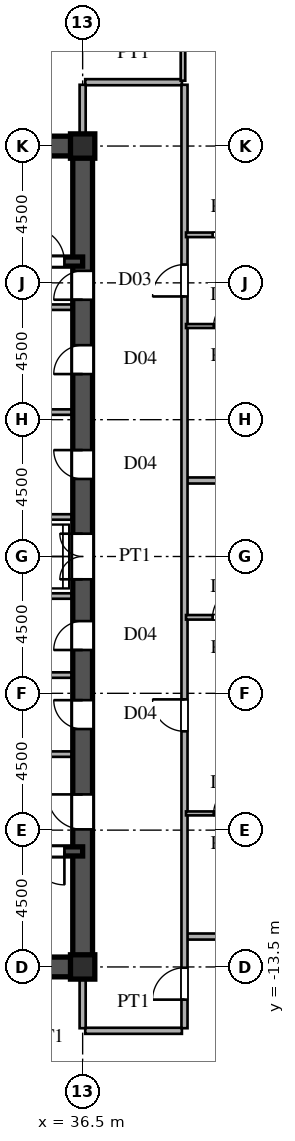
"""IFC4 building model, lengths in metres.
Left out: names, types, materials, properties, quantities, classifications, styles, units other than length and angle.
Written with IfcOpenShell. Run it as: python <this file> out.ifc"""

import sys

from ifc_helpers import new_model, si_unit, direction, frame, frame_2d, origin, origin_2d, place, context, subcontext, project, spatial, rectangle, i_section, extrude, source, transform, mapped, element, fill, save


model = new_model("IFC4")
c1 = context("Model", 3, precision=1e-05, world=origin(), true_north=direction((0.0, 1.0)))
c2 = subcontext(c1, "Body", "Model", "MODEL_VIEW")
j1 = project(units=[si_unit("LENGTHUNIT", "METRE"), si_unit("PLANEANGLEUNIT", "RADIAN")], contexts=[c1])
p1 = place(None, origin())
s1 = spatial("IfcSite", under=j1, at=p1, CompositionType="ELEMENT")
p2 = place(p1, origin())
s2 = spatial("IfcBuilding", under=s1, at=p2, CompositionType="ELEMENT")
p3 = place(p2, frame((0.0, 0.0, 96.0)))
s3 = spatial("IfcBuildingStorey", under=s2, at=p3, CompositionType="ELEMENT", Elevation=96.0)
m1 = source(origin(), c2, "Body", "SweptSolid", [
    extrude(i_section(OverallWidth=0.8, OverallDepth=0.8, WebThickness=0.032, FlangeThickness=0.05, at=origin_2d()), origin(), (0.0, 0.0, 1.0), 3.6),
])
for number, where, z_axis, x_axis in (
    (1, (36.5, -13.5, 0.0), (0.0, 0.0, 1.0), (1.0, 0.0, 0.0)),
    (2, (36.5, 13.5, 0.0), (0.0, 0.0, 1.0), (1.0, 0.0, 0.0)),
):
    element("IfcColumn", number, at=place(p3, frame(where, z_axis=z_axis, x_axis=x_axis)), inside=s3, PredefinedType="COLUMN", context=c2, shape_type="MappedRepresentation", body=[
        mapped(m1, transform((0.0, 0.0, 0.0), scale=1.0)),
    ])
for number, where, z_axis, x_axis in (
    (3, (27.5, -13.5, 0.0), (0.0, 0.0, 1.0), (1.0, 0.0, 0.0)),
    (4, (27.5, 13.5, 0.0), (0.0, 0.0, 1.0), (1.0, 0.0, 0.0)),
):
    element("IfcWall", number, at=place(p3, frame(where, z_axis=z_axis, x_axis=x_axis)), inside=s3, PredefinedType="SHEAR", context=c2, shape_type="SweptSolid", body=[
        extrude(rectangle(XDim=9.0, YDim=0.65, at=frame_2d((4.5, 0.0))), origin(), (0.0, 0.0, 1.0), 3.38),
    ])
p4 = place(p3, frame((36.5, -13.65, 0.0), z_axis=(0.0, 0.0, 1.0), x_axis=(0.0, 1.0, 0.0)))
e5 = element("IfcWall", 5, at=p4, inside=s3, PredefinedType="SHEAR", context=c2, shape_type="SweptSolid", body=[
    extrude(rectangle(XDim=7.15, YDim=0.65, at=frame_2d((3.575, 0.0))), origin(), (0.0, 0.0, 1.0), 3.38),
])
p5 = place(p4, frame((4.675, 0.0, 0.0)))
e6 = element("IfcOpeningElement", 6, at=p5, cuts=e5, PredefinedType="OPENING", context=c2, shape_type="SweptSolid", body=[
    extrude(rectangle(XDim=1.15, YDim=2.2, at=frame_2d((0.575, 1.1))), frame((0.0, 0.335, 0.0), z_axis=(0.0, -1.0, 0.0), x_axis=(1.0, 0.0, 0.0)), (0.0, 0.0, 1.0), 0.67),
])
p6 = place(p3, frame((36.5, -1.3, 0.0), z_axis=(0.0, 0.0, 1.0), x_axis=(0.0, 1.0, 0.0)))
e7 = element("IfcWall", 7, at=p6, inside=s3, PredefinedType="SHEAR", context=c2, shape_type="SweptSolid", body=[
    extrude(rectangle(XDim=2.6, YDim=0.65, at=frame_2d((1.3, 0.0))), origin(), (0.0, 0.0, 1.0), 3.38),
])
p7 = place(p6, frame((0.55, 0.0, 0.0)))
e8 = element("IfcOpeningElement", 8, at=p7, cuts=e7, PredefinedType="OPENING", context=c2, shape_type="SweptSolid", body=[
    extrude(rectangle(XDim=1.5, YDim=2.3, at=frame_2d((0.75, 1.15))), frame((0.0, 0.335, 0.0), z_axis=(0.0, -1.0, 0.0), x_axis=(1.0, 0.0, 0.0)), (0.0, 0.0, 1.0), 0.67),
])
p8 = place(p3, frame((36.5, 8.2, 0.0), z_axis=(0.0, 0.0, 1.0), x_axis=(0.0, 1.0, 0.0)))
e9 = element("IfcWall", 9, at=p8, inside=s3, PredefinedType="SHEAR", context=c2, shape_type="SweptSolid", body=[
    extrude(rectangle(XDim=5.45, YDim=0.65, at=frame_2d((2.725, 0.0))), origin(), (0.0, 0.0, 1.0), 3.38),
])
p9 = place(p8, frame((0.245, 0.0, 0.0)))
e10 = element("IfcOpeningElement", 10, at=p9, cuts=e9, PredefinedType="OPENING", context=c2, shape_type="SweptSolid", body=[
    extrude(rectangle(XDim=0.95, YDim=2.15, at=frame_2d((0.475, 1.075))), frame((0.0, 0.335, 0.0), z_axis=(0.0, -1.0, 0.0), x_axis=(1.0, 0.0, 0.0)), (0.0, 0.0, 1.0), 0.67),
])
p10 = place(p3, frame((36.5, -6.5, 0.0), z_axis=(0.0, 0.0, 1.0), x_axis=(0.0, 1.0, 0.0)))
e11 = element("IfcWall", 11, at=p10, inside=s3, PredefinedType="SHEAR", context=c2, shape_type="SweptSolid", body=[
    extrude(rectangle(XDim=2.6, YDim=0.65, at=frame_2d((1.3, 0.0))), origin(), (0.0, 0.0, 1.0), 3.38),
])
p11 = place(p10, frame((0.825, 0.0, 0.0)))
e12 = element("IfcOpeningElement", 12, at=p11, cuts=e11, PredefinedType="OPENING", context=c2, shape_type="SweptSolid", body=[
    extrude(rectangle(XDim=0.95, YDim=2.15, at=frame_2d((0.475, 1.075))), frame((0.0, 0.335, 0.0), z_axis=(0.0, -1.0, 0.0), x_axis=(1.0, 0.0, 0.0)), (0.0, 0.0, 1.0), 0.67),
])
p12 = place(p3, frame((36.5, -3.9, 0.0), z_axis=(0.0, 0.0, 1.0), x_axis=(0.0, 1.0, 0.0)))
e13 = element("IfcWall", 13, at=p12, inside=s3, PredefinedType="SHEAR", context=c2, shape_type="SweptSolid", body=[
    extrude(rectangle(XDim=2.6, YDim=0.65, at=frame_2d((1.3, 0.0))), origin(), (0.0, 0.0, 1.0), 3.38),
])
p13 = place(p12, frame((0.825, 0.0, 0.0)))
e14 = element("IfcOpeningElement", 14, at=p13, cuts=e13, PredefinedType="OPENING", context=c2, shape_type="SweptSolid", body=[
    extrude(rectangle(XDim=0.95, YDim=2.15, at=frame_2d((0.475, 1.075))), frame((0.0, 0.335, 0.0), z_axis=(0.0, -1.0, 0.0), x_axis=(1.0, 0.0, 0.0)), (0.0, 0.0, 1.0), 0.67),
])
p14 = place(p3, frame((36.5, 1.3, 0.0), z_axis=(0.0, 0.0, 1.0), x_axis=(0.0, 1.0, 0.0)))
e15 = element("IfcWall", 15, at=p14, inside=s3, PredefinedType="SHEAR", context=c2, shape_type="SweptSolid", body=[
    extrude(rectangle(XDim=3.45, YDim=0.65, at=frame_2d((1.725, 0.0))), origin(), (0.0, 0.0, 1.0), 3.38),
])
p15 = place(p14, frame((1.25, 0.0, 0.0)))
e16 = element("IfcOpeningElement", 16, at=p15, cuts=e15, PredefinedType="OPENING", context=c2, shape_type="SweptSolid", body=[
    extrude(rectangle(XDim=0.95, YDim=2.15, at=frame_2d((0.475, 1.075))), frame((0.0, 0.335, 0.0), z_axis=(0.0, -1.0, 0.0), x_axis=(1.0, 0.0, 0.0)), (0.0, 0.0, 1.0), 0.67),
])
p16 = place(p3, frame((36.5, 4.75, 0.0), z_axis=(0.0, 0.0, 1.0), x_axis=(0.0, 1.0, 0.0)))
e17 = element("IfcWall", 17, at=p16, inside=s3, PredefinedType="SHEAR", context=c2, shape_type="SweptSolid", body=[
    extrude(rectangle(XDim=3.45, YDim=0.65, at=frame_2d((1.725, 0.0))), origin(), (0.0, 0.0, 1.0), 3.38),
])
p17 = place(p16, frame((1.25, 0.0, 0.0)))
e18 = element("IfcOpeningElement", 18, at=p17, cuts=e17, PredefinedType="OPENING", context=c2, shape_type="SweptSolid", body=[
    extrude(rectangle(XDim=0.95, YDim=2.15, at=frame_2d((0.475, 1.075))), frame((0.0, 0.335, 0.0), z_axis=(0.0, -1.0, 0.0), x_axis=(1.0, 0.0, 0.0)), (0.0, 0.0, 1.0), 0.67),
])
p18 = place(p3, frame((27.5, -9.7, 0.0), z_axis=(0.0, 0.0, 1.0), x_axis=(1.0, 0.0, 0.0)))
e19 = element("IfcWall", 19, at=p18, inside=s3, PredefinedType="SHEAR", context=c2, shape_type="SweptSolid", body=[
    extrude(rectangle(XDim=9.0, YDim=0.3, at=frame_2d((4.5, 0.0))), origin(), (0.0, 0.0, 1.0), 3.38),
])
p19 = place(p18, frame((7.3, 0.0, 0.0)))
e20 = element("IfcOpeningElement", 20, at=p19, cuts=e19, PredefinedType="OPENING", context=c2, shape_type="SweptSolid", body=[
    extrude(rectangle(XDim=1.1, YDim=2.2, at=frame_2d((0.55, 1.1))), frame((0.0, 0.16, 0.0), z_axis=(0.0, -1.0, 0.0), x_axis=(1.0, 0.0, 0.0)), (0.0, 0.0, 1.0), 0.32),
])
p20 = place(p3, frame((27.5, 9.7, 0.0), z_axis=(0.0, 0.0, 1.0), x_axis=(1.0, 0.0, 0.0)))
e21 = element("IfcWall", 21, at=p20, inside=s3, PredefinedType="SHEAR", context=c2, shape_type="SweptSolid", body=[
    extrude(rectangle(XDim=9.0, YDim=0.3, at=frame_2d((4.5, 0.0))), origin(), (0.0, 0.0, 1.0), 3.38),
])
p21 = place(p20, frame((7.3, 0.0, 0.0)))
e22 = element("IfcOpeningElement", 22, at=p21, cuts=e21, PredefinedType="OPENING", context=c2, shape_type="SweptSolid", body=[
    extrude(rectangle(XDim=1.1, YDim=2.2, at=frame_2d((0.55, 1.1))), frame((0.0, 0.16, 0.0), z_axis=(0.0, -1.0, 0.0), x_axis=(1.0, 0.0, 0.0)), (0.0, 0.0, 1.0), 0.32),
])
for number, where, z_axis, x_axis in (
    (23, (30.45, -6.5, 0.0), (0.0, 0.0, 1.0), (1.0, 0.0, 0.0)),
    (24, (30.45, 8.2, 0.0), (0.0, 0.0, 1.0), (1.0, 0.0, 0.0)),
):
    element("IfcWall", number, at=place(p3, frame(where, z_axis=z_axis, x_axis=x_axis)), inside=s3, PredefinedType="PARTITIONING", context=c2, shape_type="SweptSolid", body=[
        extrude(rectangle(XDim=5.7, YDim=0.18, at=frame_2d((2.85, 0.0))), origin(), (0.0, 0.0, 1.0), 3.38),
    ])
for number, where, z_axis, x_axis in (
    (25, (33.2, -1.3, 0.0), (0.0, 0.0, 1.0), (1.0, 0.0, 0.0)),
    (26, (33.2, 1.3, 0.0), (0.0, 0.0, 1.0), (1.0, 0.0, 0.0)),
    (27, (33.2, -3.9, 0.0), (0.0, 0.0, 1.0), (1.0, 0.0, 0.0)),
    (28, (33.2, 4.75, 0.0), (0.0, 0.0, 1.0), (1.0, 0.0, 0.0)),
):
    element("IfcWall", number, at=place(p3, frame(where, z_axis=z_axis, x_axis=x_axis)), inside=s3, PredefinedType="PARTITIONING", context=c2, shape_type="SweptSolid", body=[
        extrude(rectangle(XDim=2.95, YDim=0.18, at=frame_2d((1.475, 0.0))), origin(), (0.0, 0.0, 1.0), 3.38),
    ])
p22 = place(p3, frame((36.585, -15.6, 0.0), z_axis=(0.0, 0.0, 1.0), x_axis=(1.0, 0.0, 0.0)))
e29 = element("IfcWall", 29, at=p22, inside=s3, PredefinedType="PARTITIONING", context=c2, shape_type="SweptSolid", body=[
    extrude(rectangle(XDim=3.18, YDim=0.2, at=frame_2d((1.59, 0.0))), origin(), (0.0, 0.0, 1.0), 3.38),
])
p23 = place(p3, frame((39.93, -12.5, 0.0), z_axis=(0.0, 0.0, 1.0), x_axis=(1.0, 0.0, 0.0)))
e30 = element("IfcWall", 30, at=p23, inside=s3, PredefinedType="PARTITIONING", context=c2, shape_type="SweptSolid", body=[
    extrude(rectangle(XDim=19.971, YDim=0.2, at=frame_2d((9.985, 0.0))), origin(), (0.0, 0.0, 1.0), 3.38),
])
p24 = place(p3, frame((39.9, -8.45, 0.0), z_axis=(0.0, 0.0, 1.0), x_axis=(1.0, 0.0, 0.0)))
e31 = element("IfcWall", 31, at=p24, inside=s3, PredefinedType="PARTITIONING", context=c2, shape_type="SweptSolid", body=[
    extrude(rectangle(XDim=2.7, YDim=0.13, at=frame_2d((1.35, 0.0))), origin(), (0.0, 0.0, 1.0), 3.38),
])
p25 = place(p24, frame((0.91, 0.0, 0.0)))
e32 = element("IfcOpeningElement", 32, at=p25, cuts=e31, PredefinedType="OPENING", context=c2, shape_type="SweptSolid", body=[
    extrude(rectangle(XDim=0.88, YDim=2.1, at=frame_2d((0.44, 1.05))), frame((0.0, 0.075, 0.0), z_axis=(0.0, -1.0, 0.0), x_axis=(1.0, 0.0, 0.0)), (0.0, 0.0, 1.0), 0.15),
])
p26 = place(p3, frame((39.9, -2.0, 0.0), z_axis=(0.0, 0.0, 1.0), x_axis=(1.0, 0.0, 0.0)))
e33 = element("IfcWall", 33, at=p26, inside=s3, PredefinedType="PARTITIONING", context=c2, shape_type="SweptSolid", body=[
    extrude(rectangle(XDim=2.7, YDim=0.15, at=frame_2d((1.35, 0.0))), origin(), (0.0, 0.0, 1.0), 3.38),
])
p27 = place(p26, frame((0.875, 0.0, 0.0)))
e34 = element("IfcOpeningElement", 34, at=p27, cuts=e33, PredefinedType="OPENING", context=c2, shape_type="SweptSolid", body=[
    extrude(rectangle(XDim=0.95, YDim=2.15, at=frame_2d((0.475, 1.075))), frame((0.0, 0.085, 0.0), z_axis=(0.0, -1.0, 0.0), x_axis=(1.0, 0.0, 0.0)), (0.0, 0.0, 1.0), 0.17),
])
p28 = place(p3, frame((39.93, 2.5, 0.0), z_axis=(0.0, 0.0, 1.0), x_axis=(1.0, 0.0, 0.0)))
e35 = element("IfcWall", 35, at=p28, inside=s3, PredefinedType="PARTITIONING", context=c2, shape_type="SweptSolid", body=[
    extrude(rectangle(XDim=31.075, YDim=0.2, at=frame_2d((15.538, 0.0))), origin(), (0.0, 0.0, 1.0), 3.38),
])
p29 = place(p3, frame((39.9, 7.58, 0.0), z_axis=(0.0, 0.0, 1.0), x_axis=(1.0, 0.0, 0.0)))
e36 = element("IfcWall", 36, at=p29, inside=s3, PredefinedType="PARTITIONING", context=c2, shape_type="SweptSolid", body=[
    extrude(rectangle(XDim=2.7, YDim=0.13, at=frame_2d((1.35, 0.0))), origin(), (0.0, 0.0, 1.0), 3.38),
])
p30 = place(p29, frame((0.91, 0.0, 0.0)))
e37 = element("IfcOpeningElement", 37, at=p30, cuts=e36, PredefinedType="OPENING", context=c2, shape_type="SweptSolid", body=[
    extrude(rectangle(XDim=0.88, YDim=2.1, at=frame_2d((0.44, 1.05))), frame((0.0, 0.075, 0.0), z_axis=(0.0, -1.0, 0.0), x_axis=(1.0, 0.0, 0.0)), (0.0, 0.0, 1.0), 0.15),
])
p31 = place(p3, frame((39.9, 10.58, 0.0), z_axis=(0.0, 0.0, 1.0), x_axis=(1.0, 0.0, 0.0)))
e38 = element("IfcWall", 38, at=p31, inside=s3, PredefinedType="PARTITIONING", context=c2, shape_type="SweptSolid", body=[
    extrude(rectangle(XDim=2.7, YDim=0.15, at=frame_2d((1.35, 0.0))), origin(), (0.0, 0.0, 1.0), 3.38),
])
p32 = place(p31, frame((0.875, 0.0, 0.0)))
e39 = element("IfcOpeningElement", 39, at=p32, cuts=e38, PredefinedType="OPENING", context=c2, shape_type="SweptSolid", body=[
    extrude(rectangle(XDim=0.95, YDim=2.15, at=frame_2d((0.475, 1.075))), frame((0.0, 0.085, 0.0), z_axis=(0.0, -1.0, 0.0), x_axis=(1.0, 0.0, 0.0)), (0.0, 0.0, 1.0), 0.17),
])
p33 = place(p3, frame((36.585, 15.6, 0.0), z_axis=(0.0, 0.0, 1.0), x_axis=(1.0, 0.0, 0.0)))
e40 = element("IfcWall", 40, at=p33, inside=s3, PredefinedType="PARTITIONING", context=c2, shape_type="SweptSolid", body=[
    extrude(rectangle(XDim=3.18, YDim=0.2, at=frame_2d((1.59, 0.0))), origin(), (0.0, 0.0, 1.0), 3.38),
])
for number, where, z_axis, x_axis in (
    (41, (36.5, -15.515, 0.0), (0.0, 0.0, 1.0), (0.0, 1.0, 0.0)),
    (42, (36.5, 13.83, 0.0), (0.0, 0.0, 1.0), (0.0, 1.0, 0.0)),
):
    element("IfcWall", number, at=place(p3, frame(where, z_axis=z_axis, x_axis=x_axis)), inside=s3, PredefinedType="PARTITIONING", context=c2, shape_type="SweptSolid", body=[
        extrude(rectangle(XDim=1.685, YDim=0.2, at=frame_2d((0.842, 0.0))), origin(), (0.0, 0.0, 1.0), 2.68),
    ])
p34 = place(p3, frame((39.8, 15.65, 0.0), z_axis=(0.0, 0.0, 1.0), x_axis=(0.0, 1.0, 0.0)))
e43 = element("IfcWall", 43, at=p34, inside=s3, PredefinedType="PARTITIONING", context=c2, shape_type="SweptSolid", body=[
    extrude(rectangle(XDim=5.925, YDim=0.15, at=frame_2d((2.962, 0.0))), origin(), (0.0, 0.0, 1.0), 3.38),
])
p35 = place(p34, frame((1.425, 0.0, 0.0)))
e44 = element("IfcOpeningElement", 44, at=p35, cuts=e43, PredefinedType="OPENING", context=c2, shape_type="SweptSolid", body=[
    extrude(rectangle(XDim=0.95, YDim=2.15, at=frame_2d((0.475, 1.075))), frame((0.0, 0.085, 0.0), z_axis=(0.0, -1.0, 0.0), x_axis=(1.0, 0.0, 0.0)), (0.0, 0.0, 1.0), 0.17),
])
p36 = place(p3, frame((39.85, -15.515, 0.0), z_axis=(0.0, 0.0, 1.0), x_axis=(0.0, 1.0, 0.0)))
e45 = element("IfcWall", 45, at=p36, inside=s3, PredefinedType="PARTITIONING", context=c2, shape_type="SweptSolid", body=[
    extrude(rectangle(XDim=31.03, YDim=0.2, at=frame_2d((15.515, 0.0))), origin(), (0.0, 0.0, 1.0), 3.38),
])
p37 = place(p36, frame((0.94, 0.0, 0.0)))
e46 = element("IfcOpeningElement", 46, at=p37, cuts=e45, PredefinedType="OPENING", context=c2, shape_type="SweptSolid", body=[
    extrude(rectangle(XDim=1.05, YDim=2.25, at=frame_2d((0.525, 1.125))), frame((0.0, 0.11, 0.0), z_axis=(0.0, -1.0, 0.0), x_axis=(1.0, 0.0, 0.0)), (0.0, 0.0, 1.0), 0.22),
])
p38 = place(p36, frame((9.765, 0.0, 0.0)))
e47 = element("IfcOpeningElement", 47, at=p38, cuts=e45, PredefinedType="OPENING", context=c2, shape_type="SweptSolid", body=[
    extrude(rectangle(XDim=1.05, YDim=2.25, at=frame_2d((0.525, 1.125))), frame((0.0, 0.11, 0.0), z_axis=(0.0, -1.0, 0.0), x_axis=(1.0, 0.0, 0.0)), (0.0, 0.0, 1.0), 0.22),
])
p39 = place(p36, frame((24.067, 0.0, 0.0)))
e48 = element("IfcOpeningElement", 48, at=p39, cuts=e45, PredefinedType="OPENING", context=c2, shape_type="SweptSolid", body=[
    extrude(rectangle(XDim=1.05, YDim=2.25, at=frame_2d((0.525, 1.125))), frame((0.0, 0.11, 0.0), z_axis=(0.0, -1.0, 0.0), x_axis=(1.0, 0.0, 0.0)), (0.0, 0.0, 1.0), 0.22),
])
m2 = source(origin(), c2, "Body", "SweptSolid", [
    extrude(rectangle(XDim=1.15, YDim=2.2, at=frame_2d((0.575, 1.1))), frame((0.0, 0.025, 0.0), z_axis=(0.0, -1.0, 0.0), x_axis=(1.0, 0.0, 0.0)), (0.0, 0.0, 1.0), 0.05),
])
p40 = place(p5, origin())
e49 = element("IfcDoor", 49, at=p40, inside=s3, OperationType="SINGLE_SWING_RIGHT", PredefinedType="DOOR", context=c2, shape_type="MappedRepresentation", body=[
    mapped(m2, transform((0.0, 0.0, 0.0), scale=1.0)),
])
fill(e6, e49)
m3 = source(origin(), c2, "Body", "SweptSolid", [
    extrude(rectangle(XDim=1.5, YDim=2.3, at=frame_2d((0.75, 1.15))), frame((0.0, 0.025, 0.0), z_axis=(0.0, -1.0, 0.0), x_axis=(1.0, 0.0, 0.0)), (0.0, 0.0, 1.0), 0.05),
])
p41 = place(p7, origin())
e50 = element("IfcDoor", 50, at=p41, inside=s3, OperationType="DOUBLE_SWING_LEFT", PredefinedType="DOOR", context=c2, shape_type="MappedRepresentation", body=[
    mapped(m3, transform((0.0, 0.0, 0.0), scale=1.0)),
])
fill(e8, e50)
m4 = source(origin(), c2, "Body", "SweptSolid", [
    extrude(rectangle(XDim=0.95, YDim=2.15, at=frame_2d((0.475, 1.075))), frame((0.0, 0.025, 0.0), z_axis=(0.0, -1.0, 0.0), x_axis=(1.0, 0.0, 0.0)), (0.0, 0.0, 1.0), 0.05),
])
p42 = place(p9, origin())
e51 = element("IfcDoor", 51, at=p42, inside=s3, OperationType="SINGLE_SWING_LEFT", PredefinedType="DOOR", context=c2, shape_type="MappedRepresentation", body=[
    mapped(m4, transform((0.0, 0.0, 0.0), scale=1.0)),
])
fill(e10, e51)
p43 = place(p11, origin())
e52 = element("IfcDoor", 52, at=p43, inside=s3, OperationType="SINGLE_SWING_RIGHT", PredefinedType="DOOR", context=c2, shape_type="MappedRepresentation", body=[
    mapped(m4, transform((0.0, 0.0, 0.0), scale=1.0)),
])
fill(e12, e52)
p44 = place(p13, origin())
e53 = element("IfcDoor", 53, at=p44, inside=s3, OperationType="SINGLE_SWING_LEFT", PredefinedType="DOOR", context=c2, shape_type="MappedRepresentation", body=[
    mapped(m4, transform((0.0, 0.0, 0.0), scale=1.0)),
])
fill(e14, e53)
p45 = place(p15, origin())
e54 = element("IfcDoor", 54, at=p45, inside=s3, OperationType="SINGLE_SWING_RIGHT", PredefinedType="DOOR", context=c2, shape_type="MappedRepresentation", body=[
    mapped(m4, transform((0.0, 0.0, 0.0), scale=1.0)),
])
fill(e16, e54)
p46 = place(p17, origin())
e55 = element("IfcDoor", 55, at=p46, inside=s3, OperationType="SINGLE_SWING_LEFT", PredefinedType="DOOR", context=c2, shape_type="MappedRepresentation", body=[
    mapped(m4, transform((0.0, 0.0, 0.0), scale=1.0)),
])
fill(e18, e55)
m5 = source(origin(), c2, "Body", "SweptSolid", [
    extrude(rectangle(XDim=1.1, YDim=2.2, at=frame_2d((0.55, 1.1))), frame((0.0, 0.025, 0.0), z_axis=(0.0, -1.0, 0.0), x_axis=(1.0, 0.0, 0.0)), (0.0, 0.0, 1.0), 0.05),
])
p47 = place(p19, frame((1.1, 0.0, 0.0), z_axis=(0.0, 0.0, 1.0), x_axis=(-1.0, 0.0, 0.0)))
e56 = element("IfcDoor", 56, at=p47, inside=s3, OperationType="SINGLE_SWING_RIGHT", PredefinedType="DOOR", context=c2, shape_type="MappedRepresentation", body=[
    mapped(m5, transform((0.0, 0.0, 0.0), scale=1.0)),
])
fill(e20, e56)
p48 = place(p21, origin())
e57 = element("IfcDoor", 57, at=p48, inside=s3, OperationType="SINGLE_SWING_LEFT", PredefinedType="DOOR", context=c2, shape_type="MappedRepresentation", body=[
    mapped(m5, transform((0.0, 0.0, 0.0), scale=1.0)),
])
fill(e22, e57)
m6 = source(origin(), c2, "Body", "SweptSolid", [
    extrude(rectangle(XDim=0.88, YDim=2.1, at=frame_2d((0.44, 1.05))), frame((0.0, 0.025, 0.0), z_axis=(0.0, -1.0, 0.0), x_axis=(1.0, 0.0, 0.0)), (0.0, 0.0, 1.0), 0.05),
])
p49 = place(p25, origin())
e58 = element("IfcDoor", 58, at=p49, inside=s3, OperationType="SINGLE_SWING_RIGHT", PredefinedType="DOOR", context=c2, shape_type="MappedRepresentation", body=[
    mapped(m6, transform((0.0, 0.0, 0.0), scale=1.0)),
])
fill(e32, e58)
m7 = source(origin(), c2, "Body", "SweptSolid", [
    extrude(rectangle(XDim=0.95, YDim=2.15, at=frame_2d((0.475, 1.075))), frame((0.0, 0.025, 0.0), z_axis=(0.0, -1.0, 0.0), x_axis=(1.0, 0.0, 0.0)), (0.0, 0.0, 1.0), 0.05),
])
p50 = place(p27, origin())
e59 = element("IfcDoor", 59, at=p50, inside=s3, OperationType="SINGLE_SWING_RIGHT", PredefinedType="DOOR", context=c2, shape_type="MappedRepresentation", body=[
    mapped(m7, transform((0.0, 0.0, 0.0), scale=1.0)),
])
fill(e34, e59)
p51 = place(p30, origin())
e60 = element("IfcDoor", 60, at=p51, inside=s3, OperationType="SINGLE_SWING_RIGHT", PredefinedType="DOOR", context=c2, shape_type="MappedRepresentation", body=[
    mapped(m6, transform((0.0, 0.0, 0.0), scale=1.0)),
])
fill(e37, e60)
m8 = source(origin(), c2, "Body", "SweptSolid", [
    extrude(rectangle(XDim=1.05, YDim=2.25, at=frame_2d((0.525, 1.125))), frame((0.0, 0.025, 0.0), z_axis=(0.0, -1.0, 0.0), x_axis=(1.0, 0.0, 0.0)), (0.0, 0.0, 1.0), 0.05),
])
p52 = place(p37, origin())
e61 = element("IfcDoor", 61, at=p52, inside=s3, OperationType="SINGLE_SWING_LEFT", PredefinedType="DOOR", context=c2, shape_type="MappedRepresentation", body=[
    mapped(m8, transform((0.0, 0.0, 0.0), scale=1.0)),
])
fill(e46, e61)
p53 = place(p38, origin())
e62 = element("IfcDoor", 62, at=p53, inside=s3, OperationType="SINGLE_SWING_RIGHT", PredefinedType="DOOR", context=c2, shape_type="MappedRepresentation", body=[
    mapped(m8, transform((0.0, 0.0, 0.0), scale=1.0)),
])
fill(e47, e62)
p54 = place(p39, origin())
e63 = element("IfcDoor", 63, at=p54, inside=s3, OperationType="SINGLE_SWING_LEFT", PredefinedType="DOOR", context=c2, shape_type="MappedRepresentation", body=[
    mapped(m8, transform((0.0, 0.0, 0.0), scale=1.0)),
])
fill(e48, e63)
save(model, sys.argv[1])
